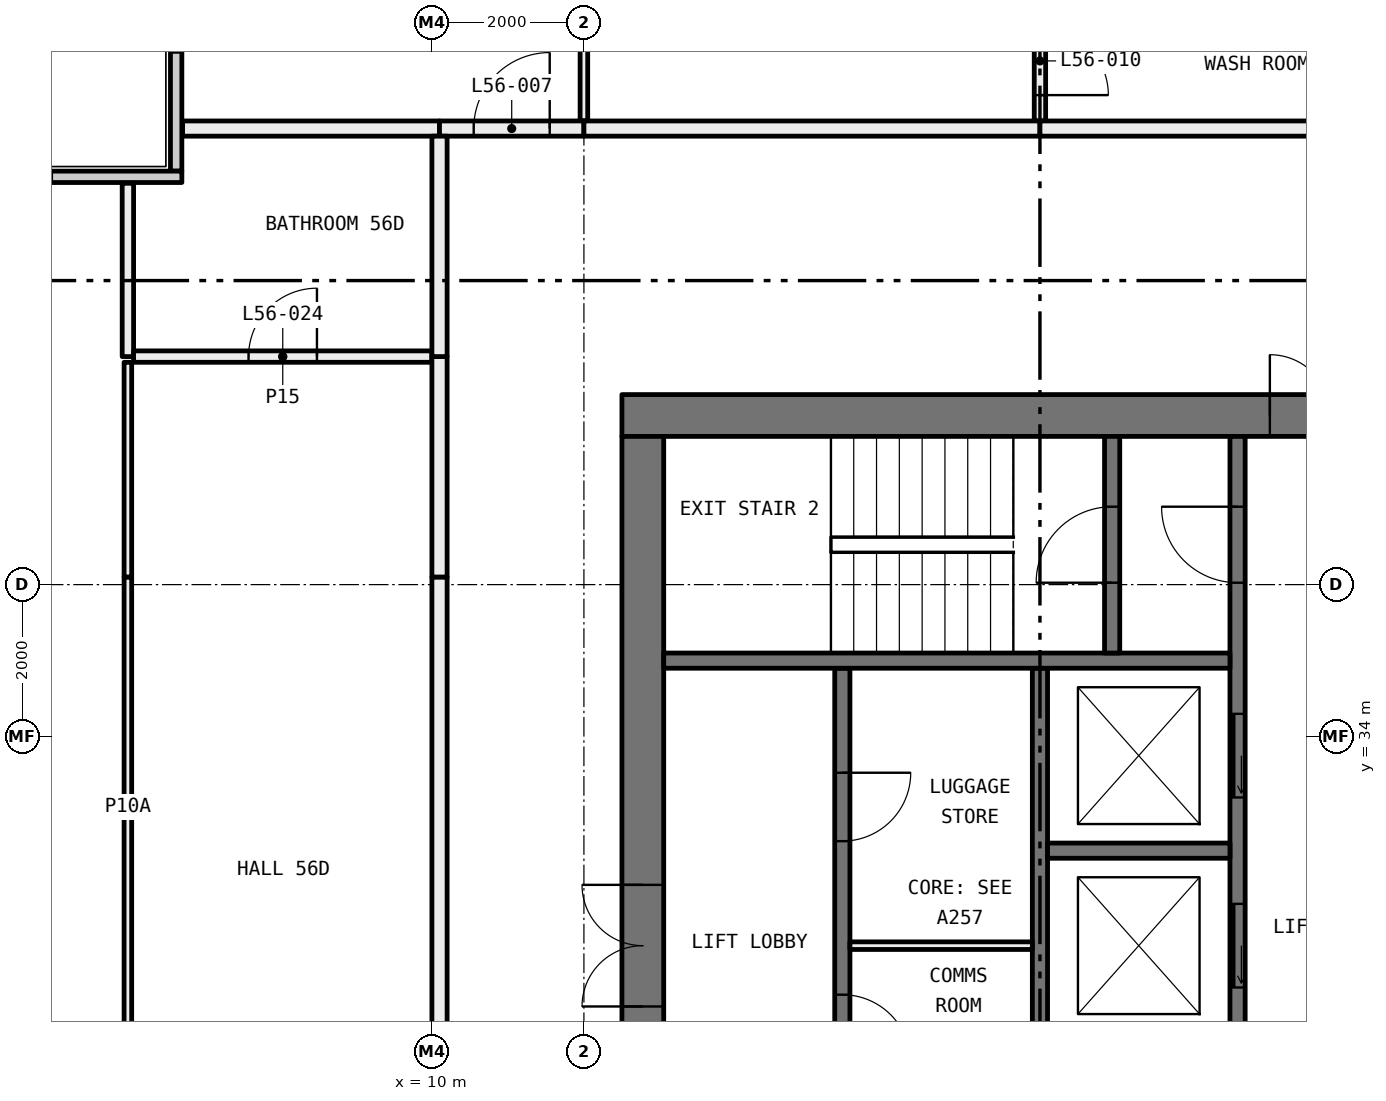
"""IFC4 building model, lengths in metres.
Left out: names, types, materials, properties, quantities, classifications, styles, units other than length and angle.
Written with IfcOpenShell. Run it as: python <this file> out.ifc"""

import sys

from ifc_helpers import new_model, si_unit, direction, frame, frame_2d, origin, place, context, subcontext, project, spatial, rectangle, extrude, element, fill, save


model = new_model("IFC4")
c1 = context("Model", 3, precision=1e-05, world=origin(), true_north=direction((0.0, 1.0)))
c2 = subcontext(c1, "Body", "Model", "MODEL_VIEW")
j1 = project(units=[si_unit("LENGTHUNIT", "METRE"), si_unit("PLANEANGLEUNIT", "RADIAN")], contexts=[c1])
p1 = place(None, origin())
s1 = spatial("IfcSite", under=j1, at=p1, CompositionType="ELEMENT")
p2 = place(p1, origin())
s2 = spatial("IfcBuilding", under=s1, at=p2, CompositionType="ELEMENT")
p3 = place(p2, frame((0.0, 0.0, 210.0)))
s3 = spatial("IfcBuildingStorey", under=s2, at=p3, CompositionType="ELEMENT", Elevation=210.0)
p4 = place(p3, frame((6.635, 41.44, 0.0), z_axis=(0.0, 0.0, 1.0), x_axis=(0.0, 1.0, 0.0)))
e1 = element("IfcWall", 1, at=p4, inside=s3, PredefinedType="ELEMENTEDWALL", context=c2, shape_type="SweptSolid", body=[
    extrude(rectangle(XDim=5.85, YDim=0.15, at=frame_2d((2.925, 0.0))), origin(), (0.0, 0.0, 1.0), 3.05),
])
p5 = place(p4, frame((1.56, 0.0, 0.45)))
e2 = element("IfcOpeningElement", 2, at=p5, cuts=e1, PredefinedType="OPENING", context=c2, shape_type="SweptSolid", body=[
    extrude(rectangle(XDim=4.0, YDim=2.55, at=frame_2d((2.0, 1.275))), frame((0.0, 0.085, 0.0), z_axis=(0.0, -1.0, 0.0), x_axis=(1.0, 0.0, 0.0)), (0.0, 0.0, 1.0), 0.17),
])
p6 = place(p3, frame((0.56, 41.365, 0.0), z_axis=(0.0, 0.0, 1.0), x_axis=(1.0, 0.0, 0.0)))
e3 = element("IfcWall", 3, at=p6, inside=s3, PredefinedType="ELEMENTEDWALL", context=c2, shape_type="SweptSolid", body=[
    extrude(rectangle(XDim=6.15, YDim=0.15, at=frame_2d((3.075, 0.0))), origin(), (0.0, 0.0, 1.0), 3.05),
])
p7 = place(p6, frame((0.44, 0.0, 0.45)))
e4 = element("IfcOpeningElement", 4, at=p7, cuts=e3, PredefinedType="OPENING", context=c2, shape_type="SweptSolid", body=[
    extrude(rectangle(XDim=4.0, YDim=2.55, at=frame_2d((2.0, 1.275))), frame((0.0, 0.085, 0.0), z_axis=(0.0, -1.0, 0.0), x_axis=(1.0, 0.0, 0.0)), (0.0, 0.0, 1.0), 0.17),
])
p8 = place(p3, frame((12.0, 42.1, 0.0), z_axis=(0.0, 0.0, 1.0), x_axis=(0.0, 1.0, 0.0)))
e5 = element("IfcWall", 5, at=p8, inside=s3, PredefinedType="PARTITIONING", context=c2, shape_type="SweptSolid", body=[
    extrude(rectangle(XDim=5.18, YDim=0.1, at=frame_2d((2.59, 0.0))), origin(), (0.0, 0.0, 1.0), 3.05),
])
p9 = place(p8, frame((2.14, 0.0, 0.0)))
e6 = element("IfcOpeningElement", 6, at=p9, cuts=e5, PredefinedType="OPENING", context=c2, shape_type="SweptSolid", body=[
    extrude(rectangle(XDim=0.9, YDim=2.1, at=frame_2d((0.45, 1.05))), frame((0.0, 0.06, 0.0), z_axis=(0.0, -1.0, 0.0), x_axis=(1.0, 0.0, 0.0)), (0.0, 0.0, 1.0), 0.12),
])
p10 = place(p3, frame((6.72, 42.0, 0.0), z_axis=(0.0, 0.0, 1.0), x_axis=(1.0, 0.0, 0.0)))
e7 = element("IfcWall", 7, at=p10, inside=s3, PredefinedType="PARTITIONING", context=c2, shape_type="SweptSolid", body=[
    extrude(rectangle(XDim=3.38, YDim=0.2, at=frame_2d((1.69, 0.0))), origin(), (0.0, 0.0, 1.0), 3.05),
])
p11 = place(p3, frame((10.1, 42.0, 0.0), z_axis=(0.0, 0.0, 1.0), x_axis=(1.0, 0.0, 0.0)))
e8 = element("IfcWall", 8, at=p11, inside=s3, PredefinedType="PARTITIONING", context=c2, shape_type="SweptSolid", body=[
    extrude(rectangle(XDim=1.9, YDim=0.2, at=frame_2d((0.95, 0.0))), origin(), (0.0, 0.0, 1.0), 3.05),
])
p12 = place(p11, frame((0.45, 0.0, 0.0)))
e9 = element("IfcOpeningElement", 9, at=p12, cuts=e8, PredefinedType="OPENING", context=c2, shape_type="SweptSolid", body=[
    extrude(rectangle(XDim=1.0, YDim=2.1, at=frame_2d((0.5, 1.05))), frame((0.0, 0.11, 0.0), z_axis=(0.0, -1.0, 0.0), x_axis=(1.0, 0.0, 0.0)), (0.0, 0.0, 1.0), 0.22),
])
p13 = place(p3, frame((18.0, 42.1, 0.0), z_axis=(0.0, 0.0, 1.0), x_axis=(0.0, 1.0, 0.0)))
e10 = element("IfcWall", 10, at=p13, inside=s3, PredefinedType="PARTITIONING", context=c2, shape_type="SweptSolid", body=[
    extrude(rectangle(XDim=1.58, YDim=0.15, at=frame_2d((0.79, 0.0))), origin(), (0.0, 0.0, 1.0), 3.05),
])
p14 = place(p13, frame((0.34, 0.0, 0.0)))
e11 = element("IfcOpeningElement", 11, at=p14, cuts=e10, PredefinedType="OPENING", context=c2, shape_type="SweptSolid", body=[
    extrude(rectangle(XDim=0.9, YDim=2.1, at=frame_2d((0.45, 1.05))), frame((0.0, 0.085, 0.0), z_axis=(0.0, -1.0, 0.0), x_axis=(1.0, 0.0, 0.0)), (0.0, 0.0, 1.0), 0.17),
])
p15 = place(p3, frame((12.0, 42.0, 0.0), z_axis=(0.0, 0.0, 1.0), x_axis=(1.0, 0.0, 0.0)))
e12 = element("IfcWall", 12, at=p15, inside=s3, PredefinedType="PARTITIONING", context=c2, shape_type="SweptSolid", body=[
    extrude(rectangle(XDim=6.0, YDim=0.2, at=frame_2d((3.0, 0.0))), origin(), (0.0, 0.0, 1.0), 3.05),
])
p16 = place(p3, frame((18.0, 42.0, 0.0), z_axis=(0.0, 0.0, 1.0), x_axis=(1.0, 0.0, 0.0)))
e13 = element("IfcWall", 13, at=p16, inside=s3, PredefinedType="PARTITIONING", context=c2, shape_type="SweptSolid", body=[
    extrude(rectangle(XDim=5.9, YDim=0.2, at=frame_2d((2.95, 0.0))), origin(), (0.0, 0.0, 1.0), 3.05),
])
p17 = place(p3, frame((6.0, 30.05, 0.0), z_axis=(0.0, 0.0, 1.0), x_axis=(0.0, 1.0, 0.0)))
e14 = element("IfcWall", 14, at=p17, inside=s3, PredefinedType="PARTITIONING", context=c2, shape_type="SweptSolid", body=[
    extrude(rectangle(XDim=6.05, YDim=0.1, at=frame_2d((3.025, 0.0))), origin(), (0.0, 0.0, 1.0), 2.45),
])
p18 = place(p3, frame((6.0, 36.1, 0.0), z_axis=(0.0, 0.0, 1.0), x_axis=(0.0, 1.0, 0.0)))
e15 = element("IfcWall", 15, at=p18, inside=s3, PredefinedType="PARTITIONING", context=c2, shape_type="SweptSolid", body=[
    extrude(rectangle(XDim=2.825, YDim=0.1, at=frame_2d((1.413, 0.0))), origin(), (0.0, 0.0, 1.0), 3.05),
])
p19 = place(p3, frame((6.0, 39.0, 0.0), z_axis=(0.0, 0.0, 1.0), x_axis=(0.0, 1.0, 0.0)))
e16 = element("IfcWall", 16, at=p19, inside=s3, PredefinedType="PARTITIONING", context=c2, shape_type="SweptSolid", body=[
    extrude(rectangle(XDim=2.28, YDim=0.15, at=frame_2d((1.14, 0.0))), origin(), (0.0, 0.0, 1.0), 3.05),
])
p20 = place(p3, frame((10.0, 39.0, 0.0), z_axis=(0.0, 0.0, 1.0), x_axis=(-1.0, 0.0, 0.0)))
e17 = element("IfcWall", 17, at=p20, inside=s3, PredefinedType="PARTITIONING", context=c2, shape_type="SweptSolid", body=[
    extrude(rectangle(XDim=3.925, YDim=0.15, at=frame_2d((1.962, 0.0))), origin(), (0.0, 0.0, 1.0), 3.05),
])
p21 = place(p20, frame((1.512, 0.0, 0.0)))
e18 = element("IfcOpeningElement", 18, at=p21, cuts=e17, PredefinedType="OPENING", context=c2, shape_type="SweptSolid", body=[
    extrude(rectangle(XDim=0.9, YDim=2.1, at=frame_2d((0.45, 1.05))), frame((0.0, 0.085, 0.0), z_axis=(0.0, -1.0, 0.0), x_axis=(1.0, 0.0, 0.0)), (0.0, 0.0, 1.0), 0.17),
])
p22 = place(p3, frame((10.1, 25.5, 0.0), z_axis=(0.0, 0.0, 1.0), x_axis=(0.0, 1.0, 0.0)))
e19 = element("IfcWall", 19, at=p22, inside=s3, PredefinedType="PARTITIONING", context=c2, shape_type="SweptSolid", body=[
    extrude(rectangle(XDim=10.6, YDim=0.2, at=frame_2d((5.3, 0.0))), origin(), (0.0, 0.0, 1.0), 2.45),
])
for number, where, z_axis, x_axis in (
    (20, (10.1, 36.1, 0.0), (0.0, 0.0, 1.0), (0.0, 1.0, 0.0)),
    (21, (10.1, 39.0, 0.0), (0.0, 0.0, 1.0), (0.0, 1.0, 0.0)),
):
    element("IfcWall", number, at=place(p3, frame(where, z_axis=z_axis, x_axis=x_axis)), inside=s3, PredefinedType="PARTITIONING", context=c2, shape_type="SweptSolid", body=[
        extrude(rectangle(XDim=2.9, YDim=0.2, at=frame_2d((1.45, 0.0))), origin(), (0.0, 0.0, 1.0), 3.05),
    ])
p23 = place(p3, frame((12.5, 38.225, 0.0), z_axis=(0.0, 0.0, 1.0), x_axis=(1.0, 0.0, 0.0)))
e22 = element("IfcWall", 22, at=p23, inside=s3, PredefinedType="SHEAR", context=c2, shape_type="SweptSolid", body=[
    extrude(rectangle(XDim=11.0, YDim=0.55, at=frame_2d((5.5, 0.0))), origin(), (0.0, 0.0, 1.0), 3.05),
])
p24 = place(p23, frame((8.525, 0.0, 0.0)))
e23 = element("IfcOpeningElement", 23, at=p24, cuts=e22, PredefinedType="OPENING", context=c2, shape_type="SweptSolid", body=[
    extrude(rectangle(XDim=1.6, YDim=2.1, at=frame_2d((0.8, 1.05))), frame((0.0, 0.285, 0.0), z_axis=(0.0, -1.0, 0.0), x_axis=(1.0, 0.0, 0.0)), (0.0, 0.0, 1.0), 0.57),
])
p25 = place(p3, frame((12.775, 22.05, 0.0), z_axis=(0.0, 0.0, 1.0), x_axis=(0.0, 1.0, 0.0)))
e24 = element("IfcWall", 24, at=p25, inside=s3, PredefinedType="SHEAR", context=c2, shape_type="SweptSolid", body=[
    extrude(rectangle(XDim=15.9, YDim=0.55, at=frame_2d((7.95, 0.0))), origin(), (0.0, 0.0, 1.0), 3.05),
])
p26 = place(p25, frame((8.4, 0.0, 0.0)))
e25 = element("IfcOpeningElement", 25, at=p26, cuts=e24, PredefinedType="OPENING", context=c2, shape_type="SweptSolid", body=[
    extrude(rectangle(XDim=1.6, YDim=2.1, at=frame_2d((0.8, 1.05))), frame((0.0, 0.285, 0.0), z_axis=(0.0, -1.0, 0.0), x_axis=(1.0, 0.0, 0.0)), (0.0, 0.0, 1.0), 0.57),
])
p27 = place(p25, frame((2.175, 0.0, 0.0)))
e26 = element("IfcOpeningElement", 26, at=p27, cuts=e24, PredefinedType="OPENING", context=c2, shape_type="SweptSolid", body=[
    extrude(rectangle(XDim=1.0, YDim=2.1, at=frame_2d((0.5, 1.05))), frame((0.0, 0.285, 0.0), z_axis=(0.0, -1.0, 0.0), x_axis=(1.0, 0.0, 0.0)), (0.0, 0.0, 1.0), 0.57),
])
p28 = place(p3, frame((15.4, 22.05, 0.0), z_axis=(0.0, 0.0, 1.0), x_axis=(0.0, 1.0, 0.0)))
e27 = element("IfcWall", 27, at=p28, inside=s3, PredefinedType="SOLIDWALL", context=c2, shape_type="SweptSolid", body=[
    extrude(rectangle(XDim=12.85, YDim=0.2, at=frame_2d((6.425, 0.0))), origin(), (0.0, 0.0, 1.0), 3.05),
])
p29 = place(p28, frame((3.65, 0.0, 0.0)))
e28 = element("IfcOpeningElement", 28, at=p29, cuts=e27, PredefinedType="OPENING", context=c2, shape_type="SweptSolid", body=[
    extrude(rectangle(XDim=1.1, YDim=2.1, at=frame_2d((0.55, 1.05))), frame((0.0, 0.11, 0.0), z_axis=(0.0, -1.0, 0.0), x_axis=(1.0, 0.0, 0.0)), (0.0, 0.0, 1.0), 0.22),
])
p30 = place(p28, frame((0.15, 0.0, 0.0)))
e29 = element("IfcOpeningElement", 29, at=p30, cuts=e27, PredefinedType="OPENING", context=c2, shape_type="SweptSolid", body=[
    extrude(rectangle(XDim=1.0, YDim=2.1, at=frame_2d((0.5, 1.05))), frame((0.0, 0.11, 0.0), z_axis=(0.0, -1.0, 0.0), x_axis=(1.0, 0.0, 0.0)), (0.0, 0.0, 1.0), 0.22),
])
p31 = place(p28, frame((5.83, 0.0, 0.0)))
e30 = element("IfcOpeningElement", 30, at=p31, cuts=e27, PredefinedType="OPENING", context=c2, shape_type="SweptSolid", body=[
    extrude(rectangle(XDim=0.9, YDim=2.1, at=frame_2d((0.45, 1.05))), frame((0.0, 0.11, 0.0), z_axis=(0.0, -1.0, 0.0), x_axis=(1.0, 0.0, 0.0)), (0.0, 0.0, 1.0), 0.22),
])
p32 = place(p28, frame((7.655, 0.0, 0.0)))
e31 = element("IfcOpeningElement", 31, at=p32, cuts=e27, PredefinedType="OPENING", context=c2, shape_type="SweptSolid", body=[
    extrude(rectangle(XDim=0.9, YDim=2.1, at=frame_2d((0.45, 1.05))), frame((0.0, 0.11, 0.0), z_axis=(0.0, -1.0, 0.0), x_axis=(1.0, 0.0, 0.0)), (0.0, 0.0, 1.0), 0.22),
])
p33 = place(p28, frame((10.575, 0.0, 0.0)))
e32 = element("IfcOpeningElement", 32, at=p33, cuts=e27, PredefinedType="OPENING", context=c2, shape_type="SweptSolid", body=[
    extrude(rectangle(XDim=0.9, YDim=2.1, at=frame_2d((0.45, 1.05))), frame((0.0, 0.11, 0.0), z_axis=(0.0, -1.0, 0.0), x_axis=(1.0, 0.0, 0.0)), (0.0, 0.0, 1.0), 0.22),
])
p34 = place(p3, frame((20.6, 25.1, 0.0), z_axis=(0.0, 0.0, 1.0), x_axis=(0.0, 1.0, 0.0)))
e33 = element("IfcWall", 33, at=p34, inside=s3, PredefinedType="SOLIDWALL", context=c2, shape_type="SweptSolid", body=[
    extrude(rectangle(XDim=12.85, YDim=0.2, at=frame_2d((6.425, 0.0))), origin(), (0.0, 0.0, 1.0), 3.05),
])
p35 = place(p34, frame((0.6, 0.0, 0.0)))
e34 = element("IfcOpeningElement", 34, at=p35, cuts=e33, PredefinedType="OPENING", context=c2, shape_type="SweptSolid", body=[
    extrude(rectangle(XDim=1.1, YDim=2.1, at=frame_2d((0.55, 1.05))), frame((0.0, 0.11, 0.0), z_axis=(0.0, -1.0, 0.0), x_axis=(1.0, 0.0, 0.0)), (0.0, 0.0, 1.0), 0.22),
])
p36 = place(p34, frame((3.1, 0.0, 0.0)))
e35 = element("IfcOpeningElement", 35, at=p36, cuts=e33, PredefinedType="OPENING", context=c2, shape_type="SweptSolid", body=[
    extrude(rectangle(XDim=1.1, YDim=2.1, at=frame_2d((0.55, 1.05))), frame((0.0, 0.11, 0.0), z_axis=(0.0, -1.0, 0.0), x_axis=(1.0, 0.0, 0.0)), (0.0, 0.0, 1.0), 0.22),
])
p37 = place(p34, frame((5.6, 0.0, 0.0)))
e36 = element("IfcOpeningElement", 36, at=p37, cuts=e33, PredefinedType="OPENING", context=c2, shape_type="SweptSolid", body=[
    extrude(rectangle(XDim=1.1, YDim=2.1, at=frame_2d((0.55, 1.05))), frame((0.0, 0.11, 0.0), z_axis=(0.0, -1.0, 0.0), x_axis=(1.0, 0.0, 0.0)), (0.0, 0.0, 1.0), 0.22),
])
p38 = place(p34, frame((8.1, 0.0, 0.0)))
e37 = element("IfcOpeningElement", 37, at=p38, cuts=e33, PredefinedType="OPENING", context=c2, shape_type="SweptSolid", body=[
    extrude(rectangle(XDim=1.1, YDim=2.1, at=frame_2d((0.55, 1.05))), frame((0.0, 0.11, 0.0), z_axis=(0.0, -1.0, 0.0), x_axis=(1.0, 0.0, 0.0)), (0.0, 0.0, 1.0), 0.22),
])
p39 = place(p34, frame((10.925, 0.0, 0.0)))
e38 = element("IfcOpeningElement", 38, at=p39, cuts=e33, PredefinedType="OPENING", context=c2, shape_type="SweptSolid", body=[
    extrude(rectangle(XDim=1.0, YDim=2.1, at=frame_2d((0.5, 1.05))), frame((0.0, 0.11, 0.0), z_axis=(0.0, -1.0, 0.0), x_axis=(1.0, 0.0, 0.0)), (0.0, 0.0, 1.0), 0.22),
])
p40 = place(p3, frame((18.0, 25.1, 0.0), z_axis=(0.0, 0.0, 1.0), x_axis=(0.0, 1.0, 0.0)))
e39 = element("IfcWall", 39, at=p40, inside=s3, PredefinedType="SOLIDWALL", context=c2, shape_type="SweptSolid", body=[
    extrude(rectangle(XDim=9.8, YDim=0.2, at=frame_2d((4.9, 0.0))), origin(), (0.0, 0.0, 1.0), 3.05),
])
p41 = place(p3, frame((13.05, 35.0, 0.0), z_axis=(0.0, 0.0, 1.0), x_axis=(1.0, 0.0, 0.0)))
e40 = element("IfcWall", 40, at=p41, inside=s3, PredefinedType="SOLIDWALL", context=c2, shape_type="SweptSolid", body=[
    extrude(rectangle(XDim=7.45, YDim=0.2, at=frame_2d((3.725, 0.0))), origin(), (0.0, 0.0, 1.0), 3.05),
])
p42 = place(p3, frame((18.95, 35.1, 0.0), z_axis=(0.0, 0.0, 1.0), x_axis=(0.0, 1.0, 0.0)))
e41 = element("IfcWall", 41, at=p42, inside=s3, PredefinedType="SOLIDWALL", context=c2, shape_type="SweptSolid", body=[
    extrude(rectangle(XDim=2.85, YDim=0.2, at=frame_2d((1.425, 0.0))), origin(), (0.0, 0.0, 1.0), 3.05),
])
p43 = place(p42, frame((0.925, 0.0, 0.0)))
e42 = element("IfcOpeningElement", 42, at=p43, cuts=e41, PredefinedType="OPENING", context=c2, shape_type="SweptSolid", body=[
    extrude(rectangle(XDim=1.0, YDim=2.1, at=frame_2d((0.5, 1.05))), frame((0.0, 0.11, 0.0), z_axis=(0.0, -1.0, 0.0), x_axis=(1.0, 0.0, 0.0)), (0.0, 0.0, 1.0), 0.22),
])
p44 = place(p3, frame((18.1, 32.5, 0.0), z_axis=(0.0, 0.0, 1.0), x_axis=(1.0, 0.0, 0.0)))
e43 = element("IfcWall", 43, at=p44, inside=s3, PredefinedType="SOLIDWALL", context=c2, shape_type="SweptSolid", body=[
    extrude(rectangle(XDim=2.4, YDim=0.2, at=frame_2d((1.2, 0.0))), origin(), (0.0, 0.0, 1.0), 3.05),
])
p45 = place(p3, frame((15.5, 31.25, 0.0), z_axis=(0.0, 0.0, 1.0), x_axis=(1.0, 0.0, 0.0)))
e44 = element("IfcWall", 44, at=p45, inside=s3, PredefinedType="PARTITIONING", context=c2, shape_type="SweptSolid", body=[
    extrude(rectangle(XDim=2.4, YDim=0.1, at=frame_2d((1.2, 0.0))), origin(), (0.0, 0.0, 1.0), 3.05),
])
p46 = place(p12, origin())
e45 = element("IfcDoor", 45, at=p46, inside=s3, OperationType="SINGLE_SWING_LEFT", PredefinedType="DOOR", context=c2, shape_type="SweptSolid", body=[
    extrude(rectangle(XDim=1.0, YDim=2.1, at=frame_2d((0.5, 1.05))), frame((0.0, 0.025, 0.0), z_axis=(0.0, -1.0, 0.0), x_axis=(1.0, 0.0, 0.0)), (0.0, 0.0, 1.0), 0.05),
])
fill(e9, e45)
p47 = place(p14, frame((0.9, 0.0, 0.0), x_axis=(-1.0, 0.0, 0.0)))
e46 = element("IfcDoor", 46, at=p47, inside=s3, OperationType="SINGLE_SWING_LEFT", PredefinedType="DOOR", context=c2, shape_type="SweptSolid", body=[
    extrude(rectangle(XDim=0.9, YDim=2.1, at=frame_2d((0.45, 1.05))), frame((0.0, 0.025, 0.0), z_axis=(0.0, -1.0, 0.0), x_axis=(1.0, 0.0, 0.0)), (0.0, 0.0, 1.0), 0.05),
])
fill(e11, e46)
p48 = place(p21, frame((0.9, 0.0, 0.0), x_axis=(-1.0, 0.0, 0.0)))
e47 = element("IfcDoor", 47, at=p48, inside=s3, OperationType="SINGLE_SWING_LEFT", PredefinedType="DOOR", context=c2, shape_type="SweptSolid", body=[
    extrude(rectangle(XDim=0.9, YDim=2.1, at=frame_2d((0.45, 1.05))), frame((0.0, 0.025, 0.0), z_axis=(0.0, -1.0, 0.0), x_axis=(1.0, 0.0, 0.0)), (0.0, 0.0, 1.0), 0.05),
])
fill(e18, e47)
p49 = place(p37, origin())
e48 = element("IfcDoor", 48, at=p49, inside=s3, OperationType="SLIDING_TO_LEFT", PredefinedType="DOOR", context=c2, shape_type="SweptSolid", body=[
    extrude(rectangle(XDim=1.1, YDim=2.1, at=frame_2d((0.55, 1.05))), frame((0.0, 0.025, 0.0), z_axis=(0.0, -1.0, 0.0), x_axis=(1.0, 0.0, 0.0)), (0.0, 0.0, 1.0), 0.05),
])
fill(e36, e48)
p50 = place(p38, origin())
e49 = element("IfcDoor", 49, at=p50, inside=s3, OperationType="SLIDING_TO_LEFT", PredefinedType="DOOR", context=c2, shape_type="SweptSolid", body=[
    extrude(rectangle(XDim=1.1, YDim=2.1, at=frame_2d((0.55, 1.05))), frame((0.0, 0.025, 0.0), z_axis=(0.0, -1.0, 0.0), x_axis=(1.0, 0.0, 0.0)), (0.0, 0.0, 1.0), 0.05),
])
fill(e37, e49)
p51 = place(p39, origin())
e50 = element("IfcDoor", 50, at=p51, inside=s3, OperationType="SINGLE_SWING_LEFT", PredefinedType="DOOR", context=c2, shape_type="SweptSolid", body=[
    extrude(rectangle(XDim=1.0, YDim=2.1, at=frame_2d((0.5, 1.05))), frame((0.0, 0.025, 0.0), z_axis=(0.0, -1.0, 0.0), x_axis=(1.0, 0.0, 0.0)), (0.0, 0.0, 1.0), 0.05),
])
fill(e38, e50)
p52 = place(p43, origin())
e51 = element("IfcDoor", 51, at=p52, inside=s3, OperationType="SINGLE_SWING_RIGHT", PredefinedType="DOOR", context=c2, shape_type="SweptSolid", body=[
    extrude(rectangle(XDim=1.0, YDim=2.1, at=frame_2d((0.5, 1.05))), frame((0.0, 0.025, 0.0), z_axis=(0.0, -1.0, 0.0), x_axis=(1.0, 0.0, 0.0)), (0.0, 0.0, 1.0), 0.05),
])
fill(e42, e51)
p53 = place(p26, origin())
e52 = element("IfcDoor", 52, at=p53, inside=s3, OperationType="DOUBLE_DOOR_SINGLE_SWING", PredefinedType="DOOR", context=c2, shape_type="SweptSolid", body=[
    extrude(rectangle(XDim=1.6, YDim=2.1, at=frame_2d((0.8, 1.05))), frame((0.0, 0.025, 0.0), z_axis=(0.0, -1.0, 0.0), x_axis=(1.0, 0.0, 0.0)), (0.0, 0.0, 1.0), 0.05),
])
fill(e25, e52)
p54 = place(p24, origin())
e53 = element("IfcDoor", 53, at=p54, inside=s3, OperationType="DOUBLE_DOOR_SINGLE_SWING", PredefinedType="DOOR", context=c2, shape_type="SweptSolid", body=[
    extrude(rectangle(XDim=1.6, YDim=2.1, at=frame_2d((0.8, 1.05))), frame((0.0, 0.025, 0.0), z_axis=(0.0, -1.0, 0.0), x_axis=(1.0, 0.0, 0.0)), (0.0, 0.0, 1.0), 0.05),
])
fill(e23, e53)
p55 = place(p32, frame((0.9, 0.0, 0.0), x_axis=(-1.0, 0.0, 0.0)))
e54 = element("IfcDoor", 54, at=p55, inside=s3, OperationType="SINGLE_SWING_LEFT", PredefinedType="DOOR", context=c2, shape_type="SweptSolid", body=[
    extrude(rectangle(XDim=0.9, YDim=2.1, at=frame_2d((0.45, 1.05))), frame((0.0, 0.025, 0.0), z_axis=(0.0, -1.0, 0.0), x_axis=(1.0, 0.0, 0.0)), (0.0, 0.0, 1.0), 0.05),
])
fill(e31, e54)
p56 = place(p33, frame((0.9, 0.0, 0.0), x_axis=(-1.0, 0.0, 0.0)))
e55 = element("IfcDoor", 55, at=p56, inside=s3, OperationType="SINGLE_SWING_RIGHT", PredefinedType="DOOR", context=c2, shape_type="SweptSolid", body=[
    extrude(rectangle(XDim=0.9, YDim=2.1, at=frame_2d((0.45, 1.05))), frame((0.0, 0.025, 0.0), z_axis=(0.0, -1.0, 0.0), x_axis=(1.0, 0.0, 0.0)), (0.0, 0.0, 1.0), 0.05),
])
fill(e32, e55)
save(model, sys.argv[1])
